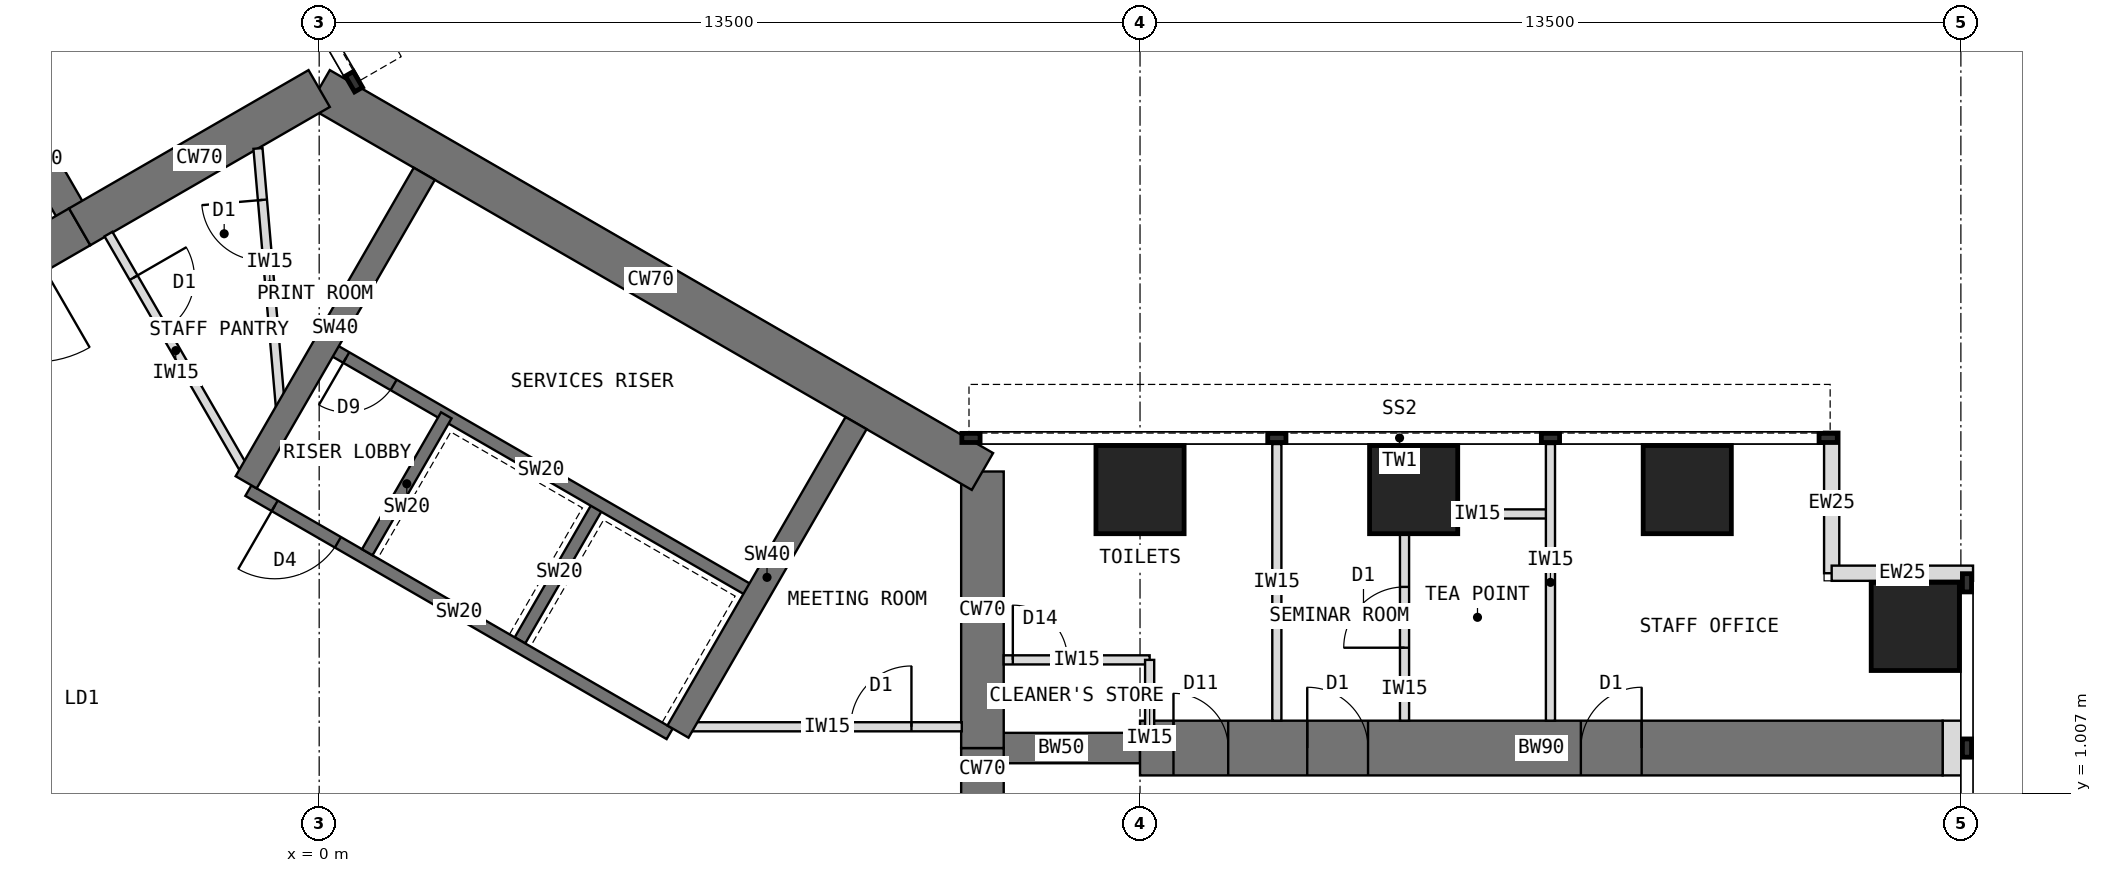
"""IFC4 building model, lengths in metres.
Left out: names, types, materials, properties, quantities, classifications, styles, units other than length and angle.
Written with IfcOpenShell. Run it as: python <this file> out.ifc"""

import sys

from ifc_helpers import new_model, si_unit, direction, frame, frame_2d, origin, origin_2d, place, context, subcontext, project, spatial, rectangle, extrude, element, fill, save


model = new_model("IFC4")
c1 = context("Model", 3, precision=1e-05, world=origin(), true_north=direction((0.0, 1.0)))
c2 = subcontext(c1, "Body", "Model", "MODEL_VIEW")
j1 = project(units=[si_unit("LENGTHUNIT", "METRE"), si_unit("PLANEANGLEUNIT", "RADIAN")], contexts=[c1])
p1 = place(None, origin())
s1 = spatial("IfcSite", under=j1, at=p1, CompositionType="ELEMENT")
p2 = place(p1, origin())
s2 = spatial("IfcBuilding", under=s1, at=p2, CompositionType="ELEMENT")
p3 = place(p2, frame((0.0, 0.0, 68.5)))
s3 = spatial("IfcBuildingStorey", under=s2, at=p3, CompositionType="ELEMENT", Elevation=68.5)
p4 = place(p3, frame((10.908, -1.75, 0.0), z_axis=(0.0, 0.0, 1.0), x_axis=(0.0, 1.0, 0.0)))
e1 = element("IfcWall", 1, at=p4, inside=s3, PredefinedType="SHEAR", context=c2, shape_type="SweptSolid", body=[
    extrude(rectangle(XDim=3.5, YDim=0.7, at=frame_2d((1.75, 0.0))), origin(), (0.0, 0.0, 1.0), 4.0),
])
p5 = place(p4, frame((0.85, 0.0, 0.0)))
e2 = element("IfcOpeningElement", 2, at=p5, cuts=e1, PredefinedType="OPENING", context=c2, shape_type="SweptSolid", body=[
    extrude(rectangle(XDim=1.8, YDim=2.1, at=frame_2d((0.9, 1.05))), frame((0.0, 0.36, 0.0), z_axis=(0.0, -1.0, 0.0), x_axis=(1.0, 0.0, 0.0)), (0.0, 0.0, 1.0), 0.72),
])
p6 = place(p3, frame((10.908, 1.75, 0.0), z_axis=(0.0, 0.0, 1.0), x_axis=(0.0, 1.0, 0.0)))
e3 = element("IfcWall", 3, at=p6, inside=s3, PredefinedType="SHEAR", context=c2, shape_type="SweptSolid", body=[
    extrude(rectangle(XDim=4.548, YDim=0.7, at=frame_2d((2.274, 0.0))), origin(), (0.0, 0.0, 1.0), 4.0),
])
p7 = place(p3, frame((10.908, 6.298, 0.0), z_axis=(0.0, 0.0, 1.0), x_axis=(-0.866021940709, 0.500005998175, 0.0)))
e4 = element("IfcWall", 4, at=p7, inside=s3, PredefinedType="SHEAR", context=c2, shape_type="SweptSolid", body=[
    extrude(rectangle(XDim=12.596, YDim=0.7, at=frame_2d((6.298, 0.0))), origin(), (0.0, 0.0, 1.0), 4.0),
])
p8 = place(p3, frame((0.0, 12.596, 0.0), z_axis=(0.0, 0.0, 1.0), x_axis=(-0.866011268655, -0.500024481964, 0.0)))
e5 = element("IfcWall", 5, at=p8, inside=s3, PredefinedType="SHEAR", context=c2, shape_type="SweptSolid", body=[
    extrude(rectangle(XDim=4.548, YDim=0.7, at=frame_2d((2.274, 0.0))), origin(), (0.0, 0.0, 1.0), 4.0),
])
p9 = place(p3, frame((-3.939, 10.322, 0.0), z_axis=(0.0, 0.0, 1.0), x_axis=(-0.866019471182, -0.500010275428, 0.0)))
e6 = element("IfcWall", 6, at=p9, inside=s3, PredefinedType="SHEAR", context=c2, shape_type="SweptSolid", body=[
    extrude(rectangle(XDim=3.5, YDim=0.7, at=frame_2d((1.75, 0.0))), origin(), (0.0, 0.0, 1.0), 4.0),
])
p10 = place(p9, frame((0.85, 0.0, 0.0)))
e7 = element("IfcOpeningElement", 7, at=p10, cuts=e6, PredefinedType="OPENING", context=c2, shape_type="SweptSolid", body=[
    extrude(rectangle(XDim=1.8, YDim=2.1, at=frame_2d((0.9, 1.05))), frame((0.0, 0.36, 0.0), z_axis=(0.0, -1.0, 0.0), x_axis=(1.0, 0.0, 0.0)), (0.0, 0.0, 1.0), 0.72),
])
p11 = place(p3, frame((10.908, 1.75, 0.0), z_axis=(0.0, 0.0, 1.0), x_axis=(1.0, 0.0, 0.0)))
e8 = element("IfcWall", 8, at=p11, inside=s3, PredefinedType="SHEAR", context=c2, shape_type="SweptSolid", body=[
    extrude(rectangle(XDim=2.592, YDim=0.5, at=frame_2d((1.296, 0.0))), origin(), (0.0, 0.0, 1.0), 4.0),
])
p12 = place(p3, frame((13.5, 1.75, 0.0), z_axis=(0.0, 0.0, 1.0), x_axis=(1.0, 0.0, 0.0)))
e9 = element("IfcWall", 9, at=p12, inside=s3, PredefinedType="SHEAR", context=c2, shape_type="SweptSolid", body=[
    extrude(rectangle(XDim=13.2, YDim=0.9, at=frame_2d((6.6, 0.0))), origin(), (0.0, 0.0, 1.0), 4.0),
])
p13 = place(p12, frame((0.55, 0.0, 0.0)))
e10 = element("IfcOpeningElement", 10, at=p13, cuts=e9, PredefinedType="OPENING", context=c2, shape_type="SweptSolid", body=[
    extrude(rectangle(XDim=0.9, YDim=2.1, at=frame_2d((0.45, 1.05))), frame((0.0, 0.46, 0.0), z_axis=(0.0, -1.0, 0.0), x_axis=(1.0, 0.0, 0.0)), (0.0, 0.0, 1.0), 0.92),
])
p14 = place(p12, frame((2.75, 0.0, 0.0)))
e11 = element("IfcOpeningElement", 11, at=p14, cuts=e9, PredefinedType="OPENING", context=c2, shape_type="SweptSolid", body=[
    extrude(rectangle(XDim=1.0, YDim=2.1, at=frame_2d((0.5, 1.05))), frame((0.0, 0.46, 0.0), z_axis=(0.0, -1.0, 0.0), x_axis=(1.0, 0.0, 0.0)), (0.0, 0.0, 1.0), 0.92),
])
p15 = place(p12, frame((7.25, 0.0, 0.0)))
e12 = element("IfcOpeningElement", 12, at=p15, cuts=e9, PredefinedType="OPENING", context=c2, shape_type="SweptSolid", body=[
    extrude(rectangle(XDim=1.0, YDim=2.1, at=frame_2d((0.5, 1.05))), frame((0.0, 0.46, 0.0), z_axis=(0.0, -1.0, 0.0), x_axis=(1.0, 0.0, 0.0)), (0.0, 0.0, 1.0), 0.92),
])
p16 = place(p3, frame((-3.939, 10.322, 0.0), z_axis=(0.0, 0.0, 1.0), x_axis=(-0.499918158782, 0.866072649678, 0.0)))
e13 = element("IfcWall", 13, at=p16, inside=s3, PredefinedType="SHEAR", context=c2, shape_type="SweptSolid", body=[
    extrude(rectangle(XDim=2.592, YDim=0.5, at=frame_2d((1.296, 0.0))), origin(), (0.0, 0.0, 1.0), 4.0),
])
for number, where, z_axis, x_axis in (
    (14, (13.5, 6.0, 0.0), (0.0, 0.0, 1.0), (1.0, 0.0, 0.0)),
    (15, (18.0, 6.0, 0.0), (0.0, 0.0, 1.0), (1.0, 0.0, 0.0)),
    (16, (22.5, 6.0, 0.0), (0.0, 0.0, 1.0), (1.0, 0.0, 0.0)),
    (17, (26.25, 3.75, 0.0), (0.0, 0.0, 1.0), (1.0, 0.0, 0.0)),
):
    element("IfcColumn", number, at=place(p3, frame(where, z_axis=z_axis, x_axis=x_axis)), inside=s3, PredefinedType="COLUMN", context=c2, shape_type="SweptSolid", body=[
        extrude(rectangle(XDim=1.45, YDim=1.45, at=origin_2d()), origin(), (0.0, 0.0, 1.0), 4.0),
    ])
for number, where, z_axis, x_axis in (
    (18, (24.875, 6.95, 0.0), (0.0, 0.0, 1.0), (0.0, -1.0, 0.0)),
    (19, (24.875, 4.625, 0.0), (0.0, 0.0, 1.0), (1.0, 0.0, 0.0)),
):
    element("IfcWall", number, at=place(p3, frame(where, z_axis=z_axis, x_axis=x_axis)), inside=s3, PredefinedType="STANDARD", context=c2, shape_type="SweptSolid", body=[
        extrude(rectangle(XDim=2.325, YDim=0.25, at=frame_2d((1.163, 0.0))), origin(), (0.0, 0.0, 1.0), 3.8),
    ])
p17 = place(p3, frame((26.7, 1.75, 0.0), z_axis=(0.0, 0.0, 1.0), x_axis=(1.0, 0.0, 0.0)))
e20 = element("IfcWall", 20, at=p17, inside=s3, PredefinedType="PARTITIONING", context=c2, shape_type="SweptSolid", body=[
    extrude(rectangle(XDim=0.31, YDim=0.9, at=frame_2d((0.155, 0.0))), origin(), (0.0, 0.0, 1.0), 3.8),
])
p18 = place(p3, frame((5.764, 1.984, 0.0), z_axis=(0.0, 0.0, 1.0), x_axis=(-0.866026010844, 0.49999894854, 0.0)))
e21 = element("IfcWall", 21, at=p18, inside=s3, PredefinedType="SHEAR", context=c2, shape_type="SweptSolid", body=[
    extrude(rectangle(XDim=8.0, YDim=0.2, at=frame_2d((4.0, 0.0))), origin(), (0.0, 0.0, 1.0), 4.0),
])
p19 = place(p18, frame((6.3, 0.0, 0.0)))
e22 = element("IfcOpeningElement", 22, at=p19, cuts=e21, PredefinedType="OPENING", context=c2, shape_type="SweptSolid", body=[
    extrude(rectangle(XDim=1.2, YDim=2.1, at=frame_2d((0.6, 1.05))), frame((0.0, 0.11, 0.0), z_axis=(0.0, -1.0, 0.0), x_axis=(1.0, 0.0, 0.0)), (0.0, 0.0, 1.0), 0.22),
])
for number, where, z_axis, x_axis in (
    (23, (3.303, 3.52, 0.0), (0.0, 0.0, 1.0), (0.5, 0.866, 0.0)),
    (24, (0.791, 4.97, 0.0), (0.0, 0.0, 1.0), (0.5, 0.866, 0.0)),
):
    element("IfcWall", number, at=place(p3, frame(where, z_axis=z_axis, x_axis=x_axis)), inside=s3, PredefinedType="SHEAR", context=c2, shape_type="SweptSolid", body=[
        extrude(rectangle(XDim=2.6, YDim=0.2, at=frame_2d((1.3, 0.0))), origin(), (0.0, 0.0, 1.0), 4.0),
    ])
p20 = place(p3, frame((7.114, 4.322, 0.0), z_axis=(0.0, 0.0, 1.0), x_axis=(-0.866026010844, 0.49999894854, 0.0)))
e25 = element("IfcWall", 25, at=p20, inside=s3, PredefinedType="SHEAR", context=c2, shape_type="SweptSolid", body=[
    extrude(rectangle(XDim=8.0, YDim=0.2, at=frame_2d((4.0, 0.0))), origin(), (0.0, 0.0, 1.0), 4.0),
])
p21 = place(p20, frame((6.8, 0.0, 0.0)))
e26 = element("IfcOpeningElement", 26, at=p21, cuts=e25, PredefinedType="OPENING", context=c2, shape_type="SweptSolid", body=[
    extrude(rectangle(XDim=0.9, YDim=2.1, at=frame_2d((0.45, 1.05))), frame((0.0, 0.11, 0.0), z_axis=(0.0, -1.0, 0.0), x_axis=(1.0, 0.0, 0.0)), (0.0, 0.0, 1.0), 0.22),
])
for number, where, z_axis, x_axis in (
    (27, (-1.201, 6.12, 0.0), (0.0, 0.0, 1.0), (0.5, 0.866, 0.0)),
    (28, (5.901, 2.02, 0.0), (0.0, 0.0, 1.0), (0.5, 0.866, 0.0)),
):
    element("IfcWall", number, at=place(p3, frame(where, z_axis=z_axis, x_axis=x_axis)), inside=s3, PredefinedType="SHEAR", context=c2, shape_type="SweptSolid", body=[
        extrude(rectangle(XDim=5.858, YDim=0.4, at=frame_2d((2.929, 0.0))), origin(), (0.0, 0.0, 1.0), 4.0),
    ])
for number, where, z_axis, x_axis in (
    (29, (15.75, 2.2, 0.0), (0.0, 0.0, 1.0), (0.0, 1.0, 0.0)),
    (30, (20.25, 2.2, 0.0), (0.0, 0.0, 1.0), (0.0, 1.0, 0.0)),
):
    element("IfcWall", number, at=place(p3, frame(where, z_axis=z_axis, x_axis=x_axis)), inside=s3, PredefinedType="PARTITIONING", context=c2, shape_type="SweptSolid", body=[
        extrude(rectangle(XDim=4.55, YDim=0.15, at=frame_2d((2.275, 0.0))), origin(), (0.0, 0.0, 1.0), 3.8),
    ])
p22 = place(p3, frame((17.85, 5.6, 0.0), z_axis=(0.0, 0.0, 1.0), x_axis=(1.0, 0.0, 0.0)))
e31 = element("IfcWall", 31, at=p22, inside=s3, PredefinedType="PARTITIONING", context=c2, shape_type="SweptSolid", body=[
    extrude(rectangle(XDim=2.4, YDim=0.15, at=frame_2d((1.2, 0.0))), origin(), (0.0, 0.0, 1.0), 3.8),
])
p23 = place(p3, frame((17.85, 2.2, 0.0), z_axis=(0.0, 0.0, 1.0), x_axis=(0.0, 1.0, 0.0)))
e32 = element("IfcWall", 32, at=p23, inside=s3, PredefinedType="PARTITIONING", context=c2, shape_type="SweptSolid", body=[
    extrude(rectangle(XDim=3.4, YDim=0.15, at=frame_2d((1.7, 0.0))), origin(), (0.0, 0.0, 1.0), 3.8),
])
p24 = place(p23, frame((1.2, 0.0, 0.0)))
e33 = element("IfcOpeningElement", 33, at=p24, cuts=e32, PredefinedType="OPENING", context=c2, shape_type="SweptSolid", body=[
    extrude(rectangle(XDim=1.0, YDim=2.1, at=frame_2d((0.5, 1.05))), frame((0.0, 0.085, 0.0), z_axis=(0.0, -1.0, 0.0), x_axis=(1.0, 0.0, 0.0)), (0.0, 0.0, 1.0), 0.17),
])
p25 = place(p3, frame((11.258, 3.2, 0.0), z_axis=(0.0, 0.0, 1.0), x_axis=(1.0, 0.0, 0.0)))
e34 = element("IfcWall", 34, at=p25, inside=s3, PredefinedType="PARTITIONING", context=c2, shape_type="SweptSolid", body=[
    extrude(rectangle(XDim=2.4, YDim=0.15, at=frame_2d((1.2, 0.0))), origin(), (0.0, 0.0, 1.0), 3.8),
])
p26 = place(p25, frame((0.15, 0.0, 0.0)))
e35 = element("IfcOpeningElement", 35, at=p26, cuts=e34, PredefinedType="OPENING", context=c2, shape_type="SweptSolid", body=[
    extrude(rectangle(XDim=0.9, YDim=2.1, at=frame_2d((0.45, 1.05))), frame((0.0, 0.085, 0.0), z_axis=(0.0, -1.0, 0.0), x_axis=(1.0, 0.0, 0.0)), (0.0, 0.0, 1.0), 0.17),
])
p27 = place(p3, frame((13.658, 2.0, 0.0), z_axis=(0.0, 0.0, 1.0), x_axis=(0.0, 1.0, 0.0)))
e36 = element("IfcWall", 36, at=p27, inside=s3, PredefinedType="PARTITIONING", context=c2, shape_type="SweptSolid", body=[
    extrude(rectangle(XDim=1.2, YDim=0.15, at=frame_2d((0.6, 0.0))), origin(), (0.0, 0.0, 1.0), 3.8),
])
p28 = place(p3, frame((-3.466, 10.202, 0.0), z_axis=(0.0, 0.0, 1.0), x_axis=(0.500007369519, -0.866021148949, 0.0)))
e37 = element("IfcWall", 37, at=p28, inside=s3, PredefinedType="PARTITIONING", context=c2, shape_type="SweptSolid", body=[
    extrude(rectangle(XDim=4.426, YDim=0.15, at=frame_2d((2.213, 0.0))), origin(), (0.0, 0.0, 1.0), 3.8),
])
p29 = place(p28, frame((0.828, 0.0, 0.0)))
e38 = element("IfcOpeningElement", 38, at=p29, cuts=e37, PredefinedType="OPENING", context=c2, shape_type="SweptSolid", body=[
    extrude(rectangle(XDim=1.0, YDim=2.1, at=frame_2d((0.5, 1.05))), frame((0.0, 0.085, 0.0), z_axis=(0.0, -1.0, 0.0), x_axis=(1.0, 0.0, 0.0)), (0.0, 0.0, 1.0), 0.17),
])
p30 = place(p3, frame((6.143, 2.1, 0.0), z_axis=(0.0, 0.0, 1.0), x_axis=(1.0, 0.0, 0.0)))
e39 = element("IfcWall", 39, at=p30, inside=s3, PredefinedType="PARTITIONING", context=c2, shape_type="SweptSolid", body=[
    extrude(rectangle(XDim=4.426, YDim=0.15, at=frame_2d((2.213, 0.0))), origin(), (0.0, 0.0, 1.0), 3.8),
])
p31 = place(p30, frame((2.598, 0.0, 0.0)))
e40 = element("IfcOpeningElement", 40, at=p31, cuts=e39, PredefinedType="OPENING", context=c2, shape_type="SweptSolid", body=[
    extrude(rectangle(XDim=1.0, YDim=2.1, at=frame_2d((0.5, 1.05))), frame((0.0, 0.085, 0.0), z_axis=(0.0, -1.0, 0.0), x_axis=(1.0, 0.0, 0.0)), (0.0, 0.0, 1.0), 0.17),
])
p32 = place(p3, frame((-0.618, 7.129, 0.0), z_axis=(0.0, 0.0, 1.0), x_axis=(-0.086409450071, 0.996259708579, 0.0)))
e41 = element("IfcWall", 41, at=p32, inside=s3, PredefinedType="PARTITIONING", context=c2, shape_type="SweptSolid", body=[
    extrude(rectangle(XDim=4.498, YDim=0.15, at=frame_2d((2.249, 0.0))), origin(), (0.0, 0.0, 1.0), 3.8),
])
p33 = place(p32, frame((2.648, 0.0, 0.0)))
e42 = element("IfcOpeningElement", 42, at=p33, cuts=e41, PredefinedType="OPENING", context=c2, shape_type="SweptSolid", body=[
    extrude(rectangle(XDim=1.0, YDim=2.1, at=frame_2d((0.5, 1.05))), frame((0.0, 0.085, 0.0), z_axis=(0.0, -1.0, 0.0), x_axis=(1.0, 0.0, 0.0)), (0.0, 0.0, 1.0), 0.17),
])
p34 = place(p19, origin())
e43 = element("IfcDoor", 43, at=p34, inside=s3, OperationType="SINGLE_SWING_RIGHT", PredefinedType="DOOR", context=c2, shape_type="SweptSolid", body=[
    extrude(rectangle(XDim=1.2, YDim=2.1, at=frame_2d((0.6, 1.05))), frame((0.0, 0.025, 0.0), z_axis=(0.0, -1.0, 0.0), x_axis=(1.0, 0.0, 0.0)), (0.0, 0.0, 1.0), 0.05),
])
fill(e22, e43)
p35 = place(p21, origin())
e44 = element("IfcDoor", 44, at=p35, inside=s3, OperationType="SINGLE_SWING_RIGHT", PredefinedType="DOOR", context=c2, shape_type="SweptSolid", body=[
    extrude(rectangle(XDim=0.9, YDim=2.1, at=frame_2d((0.45, 1.05))), frame((0.0, 0.025, 0.0), z_axis=(0.0, -1.0, 0.0), x_axis=(1.0, 0.0, 0.0)), (0.0, 0.0, 1.0), 0.05),
])
fill(e26, e44)
p36 = place(p24, origin())
e45 = element("IfcDoor", 45, at=p36, inside=s3, OperationType="SINGLE_SWING_LEFT", PredefinedType="DOOR", context=c2, shape_type="SweptSolid", body=[
    extrude(rectangle(XDim=1.0, YDim=2.1, at=frame_2d((0.5, 1.05))), frame((0.0, 0.025, 0.0), z_axis=(0.0, -1.0, 0.0), x_axis=(1.0, 0.0, 0.0)), (0.0, 0.0, 1.0), 0.05),
])
fill(e33, e45)
p37 = place(p26, origin())
e46 = element("IfcDoor", 46, at=p37, inside=s3, OperationType="SINGLE_SWING_LEFT", PredefinedType="DOOR", context=c2, shape_type="SweptSolid", body=[
    extrude(rectangle(XDim=0.9, YDim=2.1, at=frame_2d((0.45, 1.05))), frame((0.0, 0.025, 0.0), z_axis=(0.0, -1.0, 0.0), x_axis=(1.0, 0.0, 0.0)), (0.0, 0.0, 1.0), 0.05),
])
fill(e35, e46)
p38 = place(p31, origin())
e47 = element("IfcDoor", 47, at=p38, inside=s3, OperationType="SINGLE_SWING_RIGHT", PredefinedType="DOOR", context=c2, shape_type="SweptSolid", body=[
    extrude(rectangle(XDim=1.0, YDim=2.1, at=frame_2d((0.5, 1.05))), frame((0.0, 0.025, 0.0), z_axis=(0.0, -1.0, 0.0), x_axis=(1.0, 0.0, 0.0)), (0.0, 0.0, 1.0), 0.05),
])
fill(e40, e47)
p39 = place(p29, origin())
e48 = element("IfcDoor", 48, at=p39, inside=s3, OperationType="SINGLE_SWING_LEFT", PredefinedType="DOOR", context=c2, shape_type="SweptSolid", body=[
    extrude(rectangle(XDim=1.0, YDim=2.1, at=frame_2d((0.5, 1.05))), frame((0.0, 0.025, 0.0), z_axis=(0.0, -1.0, 0.0), x_axis=(1.0, 0.0, 0.0)), (0.0, 0.0, 1.0), 0.05),
])
fill(e38, e48)
p40 = place(p33, origin())
e49 = element("IfcDoor", 49, at=p40, inside=s3, OperationType="SINGLE_SWING_RIGHT", PredefinedType="DOOR", context=c2, shape_type="SweptSolid", body=[
    extrude(rectangle(XDim=1.0, YDim=2.1, at=frame_2d((0.5, 1.05))), frame((0.0, 0.025, 0.0), z_axis=(0.0, -1.0, 0.0), x_axis=(1.0, 0.0, 0.0)), (0.0, 0.0, 1.0), 0.05),
])
fill(e42, e49)
p41 = place(p13, origin())
e50 = element("IfcDoor", 50, at=p41, inside=s3, OperationType="SINGLE_SWING_LEFT", PredefinedType="DOOR", context=c2, shape_type="SweptSolid", body=[
    extrude(rectangle(XDim=0.82, YDim=2.06, at=frame_2d((0.45, 1.03))), frame((0.0, 0.025, 0.0), z_axis=(0.0, -1.0, 0.0), x_axis=(1.0, 0.0, 0.0)), (0.0, 0.0, 1.0), 0.05),
    extrude(rectangle(XDim=0.04, YDim=2.1, at=frame_2d((0.02, 1.05))), frame((0.0, 0.45, 0.0), z_axis=(0.0, -1.0, 0.0), x_axis=(1.0, 0.0, 0.0)), (0.0, 0.0, 1.0), 0.899),
    extrude(rectangle(XDim=0.04, YDim=2.1, at=frame_2d((0.88, 1.05))), frame((0.0, 0.45, 0.0), z_axis=(0.0, -1.0, 0.0), x_axis=(1.0, 0.0, 0.0)), (0.0, 0.0, 1.0), 0.899),
    extrude(rectangle(XDim=0.82, YDim=0.04, at=frame_2d((0.45, 2.08))), frame((0.0, 0.45, 0.0), z_axis=(0.0, -1.0, 0.0), x_axis=(1.0, 0.0, 0.0)), (0.0, 0.0, 1.0), 0.899),
])
fill(e10, e50)
p42 = place(p14, origin())
e51 = element("IfcDoor", 51, at=p42, inside=s3, OperationType="SINGLE_SWING_LEFT", PredefinedType="DOOR", context=c2, shape_type="SweptSolid", body=[
    extrude(rectangle(XDim=0.92, YDim=2.06, at=frame_2d((0.5, 1.03))), frame((0.0, 0.025, 0.0), z_axis=(0.0, -1.0, 0.0), x_axis=(1.0, 0.0, 0.0)), (0.0, 0.0, 1.0), 0.05),
    extrude(rectangle(XDim=0.04, YDim=2.1, at=frame_2d((0.02, 1.05))), frame((0.0, 0.45, 0.0), z_axis=(0.0, -1.0, 0.0), x_axis=(1.0, 0.0, 0.0)), (0.0, 0.0, 1.0), 0.899),
    extrude(rectangle(XDim=0.04, YDim=2.1, at=frame_2d((0.98, 1.05))), frame((0.0, 0.45, 0.0), z_axis=(0.0, -1.0, 0.0), x_axis=(1.0, 0.0, 0.0)), (0.0, 0.0, 1.0), 0.899),
    extrude(rectangle(XDim=0.92, YDim=0.04, at=frame_2d((0.5, 2.08))), frame((0.0, 0.45, 0.0), z_axis=(0.0, -1.0, 0.0), x_axis=(1.0, 0.0, 0.0)), (0.0, 0.0, 1.0), 0.899),
])
fill(e11, e51)
p43 = place(p15, origin())
e52 = element("IfcDoor", 52, at=p43, inside=s3, OperationType="SINGLE_SWING_RIGHT", PredefinedType="DOOR", context=c2, shape_type="SweptSolid", body=[
    extrude(rectangle(XDim=0.92, YDim=2.06, at=frame_2d((0.5, 1.03))), frame((0.0, 0.025, 0.0), z_axis=(0.0, -1.0, 0.0), x_axis=(1.0, 0.0, 0.0)), (0.0, 0.0, 1.0), 0.05),
    extrude(rectangle(XDim=0.04, YDim=2.1, at=frame_2d((0.02, 1.05))), frame((0.0, 0.45, 0.0), z_axis=(0.0, -1.0, 0.0), x_axis=(1.0, 0.0, 0.0)), (0.0, 0.0, 1.0), 0.899),
    extrude(rectangle(XDim=0.04, YDim=2.1, at=frame_2d((0.98, 1.05))), frame((0.0, 0.45, 0.0), z_axis=(0.0, -1.0, 0.0), x_axis=(1.0, 0.0, 0.0)), (0.0, 0.0, 1.0), 0.899),
    extrude(rectangle(XDim=0.92, YDim=0.04, at=frame_2d((0.5, 2.08))), frame((0.0, 0.45, 0.0), z_axis=(0.0, -1.0, 0.0), x_axis=(1.0, 0.0, 0.0)), (0.0, 0.0, 1.0), 0.899),
])
fill(e12, e52)
save(model, sys.argv[1])
